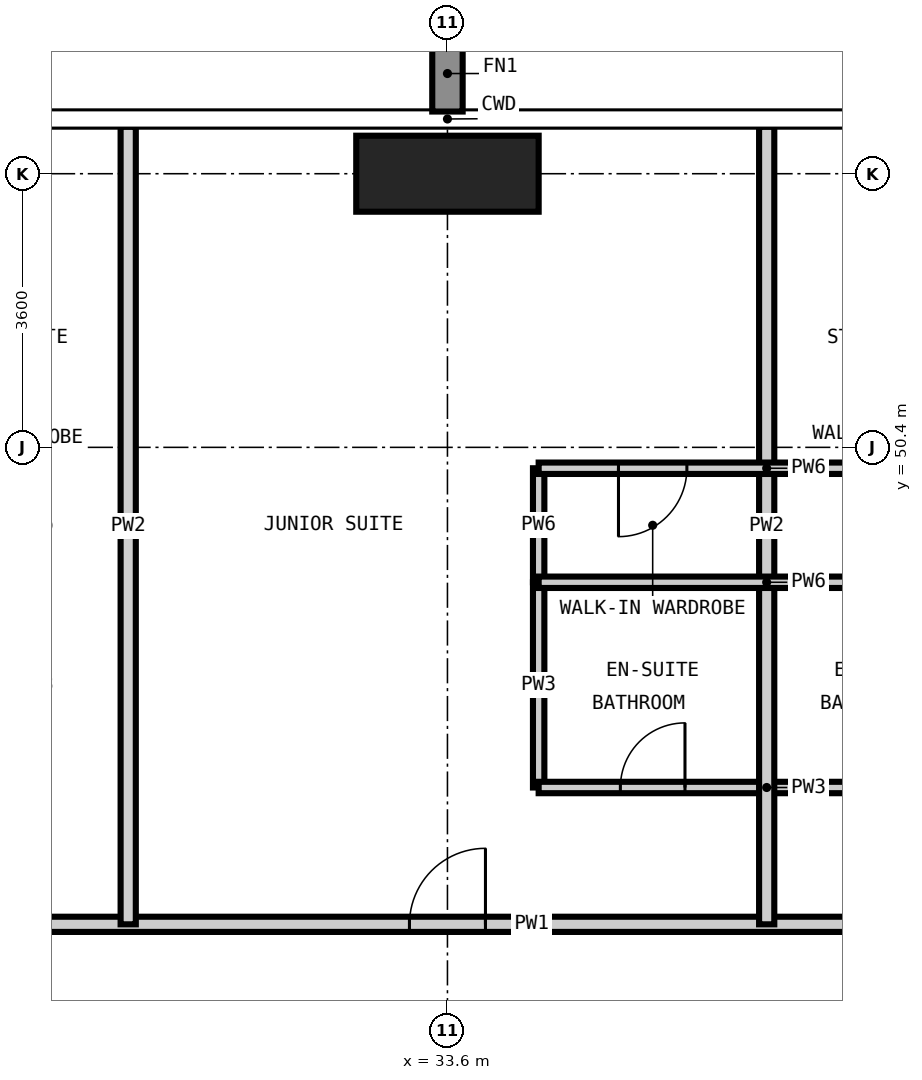
"""IFC4 building model, lengths in metres.
Left out: names, types, materials, properties, quantities, classifications, styles, units other than length and angle.
Written with IfcOpenShell. Run it as: python <this file> out.ifc"""

import sys

from ifc_helpers import new_model, si_unit, direction, frame, frame_2d, origin, origin_2d, place, context, subcontext, project, spatial, rectangle, extrude, element, fill, save


model = new_model("IFC4")
c1 = context("Model", 3, precision=1e-05, world=origin(), true_north=direction((0.0, 1.0)))
c2 = subcontext(c1, "Body", "Model", "MODEL_VIEW")
j1 = project(units=[si_unit("LENGTHUNIT", "METRE"), si_unit("PLANEANGLEUNIT", "RADIAN")], contexts=[c1])
p1 = place(None, origin())
s1 = spatial("IfcSite", under=j1, at=p1, CompositionType="ELEMENT")
p2 = place(p1, origin())
s2 = spatial("IfcBuilding", under=s1, at=p2, CompositionType="ELEMENT")
p3 = place(p2, frame((0.0, 0.0, 264.6)))
s3 = spatial("IfcBuildingStorey", under=s2, at=p3, CompositionType="ELEMENT", Elevation=264.6)
p4 = place(p3, frame((33.6, 54.0, -0.35), z_axis=(0.0, 0.0, 1.0), x_axis=(1.0, 0.0, 0.0)))
e1 = element("IfcColumn", 1, at=p4, inside=s3, PredefinedType="COLUMN", context=c2, shape_type="SweptSolid", body=[
    extrude(rectangle(XDim=2.4, YDim=1.0, at=origin_2d()), origin(), (0.0, 0.0, 1.0), 3.9),
])
p5 = place(p3, frame((34.8, 45.925, 0.0), z_axis=(0.0, 0.0, 1.0), x_axis=(0.0, 1.0, 0.0)))
e2 = element("IfcWall", 2, at=p5, inside=s3, PredefinedType="PARTITIONING", context=c2, shape_type="SweptSolid", body=[
    extrude(rectangle(XDim=2.7, YDim=0.15, at=frame_2d((1.35, 0.0))), origin(), (0.0, 0.0, 1.0), 3.55),
])
p6 = place(p3, frame((34.8, 45.925, 0.0), z_axis=(0.0, 0.0, 1.0), x_axis=(1.0, 0.0, 0.0)))
e3 = element("IfcWall", 3, at=p6, inside=s3, PredefinedType="PARTITIONING", context=c2, shape_type="SweptSolid", body=[
    extrude(rectangle(XDim=6.0, YDim=0.15, at=frame_2d((3.0, 0.0))), origin(), (0.0, 0.0, 1.0), 3.55),
])
p7 = place(p6, frame((1.075, 0.0, 0.0)))
e4 = element("IfcOpeningElement", 4, at=p7, cuts=e3, PredefinedType="OPENING", context=c2, shape_type="SweptSolid", body=[
    extrude(rectangle(XDim=0.85, YDim=2.1, at=frame_2d((0.425, 1.05))), frame((0.0, 0.085, 0.0), z_axis=(0.0, -1.0, 0.0), x_axis=(1.0, 0.0, 0.0)), (0.0, 0.0, 1.0), 0.17),
])
p8 = place(p6, frame((4.075, 0.0, 0.0)))
e5 = element("IfcOpeningElement", 5, at=p8, cuts=e3, PredefinedType="OPENING", context=c2, shape_type="SweptSolid", body=[
    extrude(rectangle(XDim=0.85, YDim=2.1, at=frame_2d((0.425, 1.05))), frame((0.0, 0.085, 0.0), z_axis=(0.0, -1.0, 0.0), x_axis=(1.0, 0.0, 0.0)), (0.0, 0.0, 1.0), 0.17),
])
p9 = place(p3, frame((22.475, 44.125, 0.0), z_axis=(0.0, 0.0, 1.0), x_axis=(1.0, 0.0, 0.0)))
e6 = element("IfcWall", 6, at=p9, inside=s3, PredefinedType="PARTITIONING", context=c2, shape_type="SweptSolid", body=[
    extrude(rectangle(XDim=22.85, YDim=0.2, at=frame_2d((11.425, 0.0))), origin(), (0.0, 0.0, 1.0), 3.55),
])
p10 = place(p9, frame((4.325, 0.0, 0.0)))
e7 = element("IfcOpeningElement", 7, at=p10, cuts=e6, PredefinedType="OPENING", context=c2, shape_type="SweptSolid", body=[
    extrude(rectangle(XDim=1.0, YDim=2.2, at=frame_2d((0.5, 1.1))), frame((0.0, 0.11, 0.0), z_axis=(0.0, -1.0, 0.0), x_axis=(1.0, 0.0, 0.0)), (0.0, 0.0, 1.0), 0.22),
])
p11 = place(p9, frame((10.625, 0.0, 0.0)))
e8 = element("IfcOpeningElement", 8, at=p11, cuts=e6, PredefinedType="OPENING", context=c2, shape_type="SweptSolid", body=[
    extrude(rectangle(XDim=1.0, YDim=2.2, at=frame_2d((0.5, 1.1))), frame((0.0, 0.11, 0.0), z_axis=(0.0, -1.0, 0.0), x_axis=(1.0, 0.0, 0.0)), (0.0, 0.0, 1.0), 0.22),
])
p12 = place(p9, frame((16.925, 0.0, 0.0)))
e9 = element("IfcOpeningElement", 9, at=p12, cuts=e6, PredefinedType="OPENING", context=c2, shape_type="SweptSolid", body=[
    extrude(rectangle(XDim=1.0, YDim=2.2, at=frame_2d((0.5, 1.1))), frame((0.0, 0.11, 0.0), z_axis=(0.0, -1.0, 0.0), x_axis=(1.0, 0.0, 0.0)), (0.0, 0.0, 1.0), 0.22),
])
for number, where, z_axis, x_axis in (
    (10, (29.4, 44.125, 0.0), (0.0, 0.0, 1.0), (0.0, 1.0, 0.0)),
    (11, (37.8, 44.125, 0.0), (0.0, 0.0, 1.0), (0.0, 1.0, 0.0)),
):
    element("IfcWall", number, at=place(p3, frame(where, z_axis=z_axis, x_axis=x_axis)), inside=s3, PredefinedType="PARTITIONING", context=c2, shape_type="SweptSolid", body=[
        extrude(rectangle(XDim=10.493, YDim=0.2, at=frame_2d((5.247, 0.0))), origin(), (0.0, 0.0, 1.0), 3.55),
    ])
p13 = place(p3, frame((34.8, 48.625, 0.0), z_axis=(0.0, 0.0, 1.0), x_axis=(0.0, 1.0, 0.0)))
e12 = element("IfcWall", 12, at=p13, inside=s3, PredefinedType="PARTITIONING", context=c2, shape_type="SweptSolid", body=[
    extrude(rectangle(XDim=1.5, YDim=0.15, at=frame_2d((0.75, 0.0))), origin(), (0.0, 0.0, 1.0), 3.55),
])
p14 = place(p3, frame((34.8, 48.625, 0.0), z_axis=(0.0, 0.0, 1.0), x_axis=(1.0, 0.0, 0.0)))
e13 = element("IfcWall", 13, at=p14, inside=s3, PredefinedType="PARTITIONING", context=c2, shape_type="SweptSolid", body=[
    extrude(rectangle(XDim=6.0, YDim=0.15, at=frame_2d((3.0, 0.0))), origin(), (0.0, 0.0, 1.0), 3.55),
])
p15 = place(p3, frame((34.8, 50.125, 0.0), z_axis=(0.0, 0.0, 1.0), x_axis=(1.0, 0.0, 0.0)))
e14 = element("IfcWall", 14, at=p15, inside=s3, PredefinedType="PARTITIONING", context=c2, shape_type="SweptSolid", body=[
    extrude(rectangle(XDim=6.0, YDim=0.15, at=frame_2d((3.0, 0.0))), origin(), (0.0, 0.0, 1.0), 3.55),
])
p16 = place(p15, frame((1.05, 0.0, 0.0)))
e15 = element("IfcOpeningElement", 15, at=p16, cuts=e14, PredefinedType="OPENING", context=c2, shape_type="SweptSolid", body=[
    extrude(rectangle(XDim=0.9, YDim=2.1, at=frame_2d((0.45, 1.05))), frame((0.0, 0.085, 0.0), z_axis=(0.0, -1.0, 0.0), x_axis=(1.0, 0.0, 0.0)), (0.0, 0.0, 1.0), 0.17),
])
p17 = place(p15, frame((4.05, 0.0, 0.0)))
e16 = element("IfcOpeningElement", 16, at=p17, cuts=e14, PredefinedType="OPENING", context=c2, shape_type="SweptSolid", body=[
    extrude(rectangle(XDim=0.9, YDim=2.1, at=frame_2d((0.45, 1.05))), frame((0.0, 0.085, 0.0), z_axis=(0.0, -1.0, 0.0), x_axis=(1.0, 0.0, 0.0)), (0.0, 0.0, 1.0), 0.17),
])
p18 = place(p11, origin())
e17 = element("IfcDoor", 17, at=p18, inside=s3, OperationType="SINGLE_SWING_RIGHT", PredefinedType="DOOR", context=c2, shape_type="SweptSolid", body=[
    extrude(rectangle(XDim=1.0, YDim=2.2, at=frame_2d((0.5, 1.1))), frame((0.0, 0.025, 0.0), z_axis=(0.0, -1.0, 0.0), x_axis=(1.0, 0.0, 0.0)), (0.0, 0.0, 1.0), 0.05),
])
fill(e8, e17)
p19 = place(p7, origin())
e18 = element("IfcDoor", 18, at=p19, inside=s3, OperationType="SINGLE_SWING_RIGHT", PredefinedType="DOOR", context=c2, shape_type="SweptSolid", body=[
    extrude(rectangle(XDim=0.85, YDim=2.1, at=frame_2d((0.425, 1.05))), frame((0.0, 0.025, 0.0), z_axis=(0.0, -1.0, 0.0), x_axis=(1.0, 0.0, 0.0)), (0.0, 0.0, 1.0), 0.05),
])
fill(e4, e18)
p20 = place(p16, frame((0.9, 0.0, 0.0), z_axis=(0.0, 0.0, 1.0), x_axis=(-1.0, 0.0, 0.0)))
e19 = element("IfcDoor", 19, at=p20, inside=s3, OperationType="SINGLE_SWING_RIGHT", PredefinedType="DOOR", context=c2, shape_type="SweptSolid", body=[
    extrude(rectangle(XDim=0.9, YDim=2.1, at=frame_2d((0.45, 1.05))), frame((0.0, 0.025, 0.0), z_axis=(0.0, -1.0, 0.0), x_axis=(1.0, 0.0, 0.0)), (0.0, 0.0, 1.0), 0.05),
])
fill(e15, e19)
save(model, sys.argv[1])
